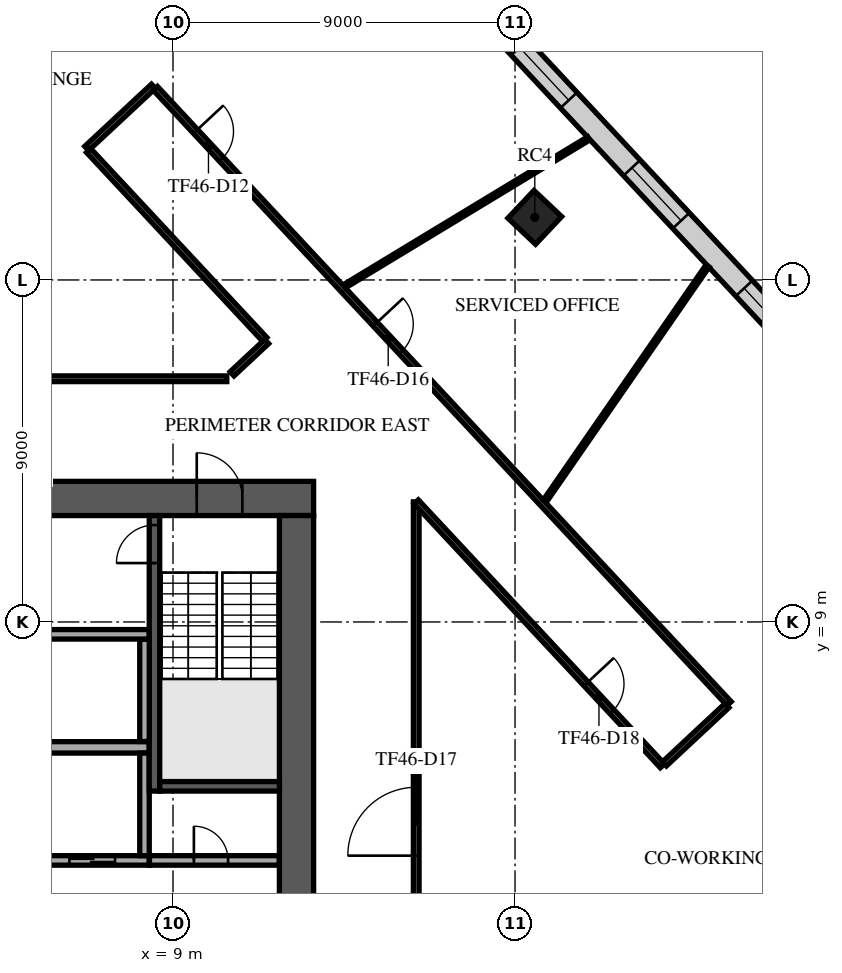
"""IFC4 building model, lengths in metres.
Left out: names, types, materials, properties, quantities, classifications, styles, units other than length and angle.
Written with IfcOpenShell. Run it as: python <this file> out.ifc"""

import sys

from ifc_helpers import new_model, si_unit, direction, frame, frame_2d, origin, origin_2d, place, context, subcontext, project, spatial, rectangle, extrude, element, fill, save


model = new_model("IFC4")
c1 = context("Model", 3, precision=1e-05, world=origin(), true_north=direction((0.0, 1.0)))
c2 = subcontext(c1, "Body", "Model", "MODEL_VIEW")
j1 = project(units=[si_unit("LENGTHUNIT", "METRE"), si_unit("PLANEANGLEUNIT", "RADIAN")], contexts=[c1])
p1 = place(None, origin())
s1 = spatial("IfcSite", under=j1, at=p1, CompositionType="ELEMENT")
p2 = place(p1, origin())
s2 = spatial("IfcBuilding", under=s1, at=p2, CompositionType="ELEMENT")
p3 = place(p2, frame((0.0, 0.0, 197.3)))
s3 = spatial("IfcBuildingStorey", under=s2, at=p3, CompositionType="ELEMENT", Elevation=197.3)
p4 = place(p3, frame((18.52, 19.647, 0.0), z_axis=(0.0, 0.0, 1.0), x_axis=(0.685916152371, 0.727680583715, 0.0)))
e1 = element("IfcColumn", 1, at=p4, inside=s3, PredefinedType="COLUMN", context=c2, shape_type="SweptSolid", body=[
    extrude(rectangle(XDim=1.0, YDim=1.0, at=origin_2d()), origin(), (0.0, 0.0, 1.0), 4.0),
])
p5 = place(p3, frame((-12.7, 12.25, 0.0), z_axis=(0.0, 0.0, 1.0), x_axis=(1.0, 0.0, 0.0)))
e2 = element("IfcWall", 2, at=p5, inside=s3, PredefinedType="SHEAR", context=c2, shape_type="SweptSolid", body=[
    extrude(rectangle(XDim=25.4, YDim=0.9, at=frame_2d((12.7, 0.0))), origin(), (0.0, 0.0, 1.0), 3.62),
])
p6 = place(p5, frame((11.5, 0.0, 0.0)))
e3 = element("IfcOpeningElement", 3, at=p6, cuts=e2, PredefinedType="OPENING", context=c2, shape_type="SweptSolid", body=[
    extrude(rectangle(XDim=2.4, YDim=2.4, at=frame_2d((1.2, 1.2))), frame((0.0, 0.46, 0.0), z_axis=(0.0, -1.0, 0.0), x_axis=(1.0, 0.0, 0.0)), (0.0, 0.0, 1.0), 0.92),
])
p7 = place(p5, frame((22.325, 0.0, 0.0)))
e4 = element("IfcOpeningElement", 4, at=p7, cuts=e2, PredefinedType="OPENING", context=c2, shape_type="SweptSolid", body=[
    extrude(rectangle(XDim=1.2, YDim=2.1, at=frame_2d((0.6, 1.05))), frame((0.0, 0.46, 0.0), z_axis=(0.0, -1.0, 0.0), x_axis=(1.0, 0.0, 0.0)), (0.0, 0.0, 1.0), 0.92),
])
p8 = place(p5, frame((1.3, 0.0, 0.0)))
e5 = element("IfcOpeningElement", 5, at=p8, cuts=e2, PredefinedType="OPENING", context=c2, shape_type="SweptSolid", body=[
    extrude(rectangle(XDim=1.0, YDim=2.1, at=frame_2d((0.5, 1.05))), frame((0.0, 0.46, 0.0), z_axis=(0.0, -1.0, 0.0), x_axis=(1.0, 0.0, 0.0)), (0.0, 0.0, 1.0), 0.92),
])
p9 = place(p3, frame((12.25, -11.8, 0.0), z_axis=(0.0, 0.0, 1.0), x_axis=(0.0, 1.0, 0.0)))
e6 = element("IfcWall", 6, at=p9, inside=s3, PredefinedType="SHEAR", context=c2, shape_type="SweptSolid", body=[
    extrude(rectangle(XDim=23.6, YDim=0.9, at=frame_2d((11.8, 0.0))), origin(), (0.0, 0.0, 1.0), 3.62),
])
p10 = place(p9, frame((10.6, 0.0, 0.0)))
e7 = element("IfcOpeningElement", 7, at=p10, cuts=e6, PredefinedType="OPENING", context=c2, shape_type="SweptSolid", body=[
    extrude(rectangle(XDim=2.4, YDim=2.4, at=frame_2d((1.2, 1.2))), frame((0.0, 0.46, 0.0), z_axis=(0.0, -1.0, 0.0), x_axis=(1.0, 0.0, 0.0)), (0.0, 0.0, 1.0), 0.92),
])
p11 = place(p3, frame((-8.375, 5.7, 0.0), z_axis=(0.0, 0.0, 1.0), x_axis=(1.0, 0.0, 0.0)))
e8 = element("IfcWall", 8, at=p11, inside=s3, PredefinedType="SOLIDWALL", context=c2, shape_type="SweptSolid", body=[
    extrude(rectangle(XDim=16.75, YDim=0.3, at=frame_2d((8.375, 0.0))), origin(), (0.0, 0.0, 1.0), 3.62),
])
p12 = place(p3, frame((-8.375, 2.725, 0.0), z_axis=(0.0, 0.0, 1.0), x_axis=(1.0, 0.0, 0.0)))
e9 = element("IfcWall", 9, at=p12, inside=s3, PredefinedType="SOLIDWALL", context=c2, shape_type="SweptSolid", body=[
    extrude(rectangle(XDim=16.75, YDim=0.25, at=frame_2d((8.375, 0.0))), origin(), (0.0, 0.0, 1.0), 3.62),
])
p13 = place(p12, frame((0.9, 0.0, 0.0)))
e10 = element("IfcOpeningElement", 10, at=p13, cuts=e9, PredefinedType="OPENING", context=c2, shape_type="SweptSolid", body=[
    extrude(rectangle(XDim=1.2, YDim=2.1, at=frame_2d((0.6, 1.05))), frame((0.0, 0.135, 0.0), z_axis=(0.0, -1.0, 0.0), x_axis=(1.0, 0.0, 0.0)), (0.0, 0.0, 1.0), 0.27),
])
p14 = place(p12, frame((3.65, 0.0, 0.0)))
e11 = element("IfcOpeningElement", 11, at=p14, cuts=e9, PredefinedType="OPENING", context=c2, shape_type="SweptSolid", body=[
    extrude(rectangle(XDim=1.2, YDim=2.1, at=frame_2d((0.6, 1.05))), frame((0.0, 0.135, 0.0), z_axis=(0.0, -1.0, 0.0), x_axis=(1.0, 0.0, 0.0)), (0.0, 0.0, 1.0), 0.27),
])
p15 = place(p12, frame((6.4, 0.0, 0.0)))
e12 = element("IfcOpeningElement", 12, at=p15, cuts=e9, PredefinedType="OPENING", context=c2, shape_type="SweptSolid", body=[
    extrude(rectangle(XDim=1.2, YDim=2.1, at=frame_2d((0.6, 1.05))), frame((0.0, 0.135, 0.0), z_axis=(0.0, -1.0, 0.0), x_axis=(1.0, 0.0, 0.0)), (0.0, 0.0, 1.0), 0.27),
])
p16 = place(p12, frame((9.15, 0.0, 0.0)))
e13 = element("IfcOpeningElement", 13, at=p16, cuts=e9, PredefinedType="OPENING", context=c2, shape_type="SweptSolid", body=[
    extrude(rectangle(XDim=1.2, YDim=2.1, at=frame_2d((0.6, 1.05))), frame((0.0, 0.135, 0.0), z_axis=(0.0, -1.0, 0.0), x_axis=(1.0, 0.0, 0.0)), (0.0, 0.0, 1.0), 0.27),
])
p17 = place(p12, frame((11.9, 0.0, 0.0)))
e14 = element("IfcOpeningElement", 14, at=p17, cuts=e9, PredefinedType="OPENING", context=c2, shape_type="SweptSolid", body=[
    extrude(rectangle(XDim=1.2, YDim=2.1, at=frame_2d((0.6, 1.05))), frame((0.0, 0.135, 0.0), z_axis=(0.0, -1.0, 0.0), x_axis=(1.0, 0.0, 0.0)), (0.0, 0.0, 1.0), 0.27),
])
p18 = place(p12, frame((14.65, 0.0, 0.0)))
e15 = element("IfcOpeningElement", 15, at=p18, cuts=e9, PredefinedType="OPENING", context=c2, shape_type="SweptSolid", body=[
    extrude(rectangle(XDim=1.2, YDim=2.1, at=frame_2d((0.6, 1.05))), frame((0.0, 0.135, 0.0), z_axis=(0.0, -1.0, 0.0), x_axis=(1.0, 0.0, 0.0)), (0.0, 0.0, 1.0), 0.27),
])
p19 = place(p3, frame((8.25, 2.85, 0.0), z_axis=(0.0, 0.0, 1.0), x_axis=(0.0, 1.0, 0.0)))
e16 = element("IfcWall", 16, at=p19, inside=s3, PredefinedType="SOLIDWALL", context=c2, shape_type="SweptSolid", body=[
    extrude(rectangle(XDim=2.7, YDim=0.25, at=frame_2d((1.35, 0.0))), origin(), (0.0, 0.0, 1.0), 3.62),
])
p20 = place(p3, frame((8.512, 4.55, 0.0), z_axis=(0.0, 0.0, 1.0), x_axis=(0.0, 1.0, 0.0)))
e17 = element("IfcWall", 17, at=p20, inside=s3, PredefinedType="SOLIDWALL", context=c2, shape_type="SweptSolid", body=[
    extrude(rectangle(XDim=7.25, YDim=0.275, at=frame_2d((3.625, 0.0))), origin(), (0.0, 0.0, 1.0), 3.62),
])
p21 = place(p20, frame((6.0, 0.0, 0.0)))
e18 = element("IfcOpeningElement", 18, at=p21, cuts=e17, PredefinedType="OPENING", context=c2, shape_type="SweptSolid", body=[
    extrude(rectangle(XDim=1.0, YDim=2.1, at=frame_2d((0.5, 1.05))), frame((0.0, 0.147, 0.0), z_axis=(0.0, -1.0, 0.0), x_axis=(1.0, 0.0, 0.0)), (0.0, 0.0, 1.0), 0.295),
])
p22 = place(p3, frame((8.65, 4.675, 0.0), z_axis=(0.0, 0.0, 1.0), x_axis=(1.0, 0.0, 0.0)))
e19 = element("IfcWall", 19, at=p22, inside=s3, PredefinedType="SOLIDWALL", context=c2, shape_type="SweptSolid", body=[
    extrude(rectangle(XDim=3.15, YDim=0.25, at=frame_2d((1.575, 0.0))), origin(), (0.0, 0.0, 1.0), 3.62),
])
p23 = place(p3, frame((8.38, 2.725, 0.0), z_axis=(0.0, 0.0, 1.0), x_axis=(1.0, 0.0, 0.0)))
e20 = element("IfcWall", 20, at=p23, inside=s3, PredefinedType="PARTITIONING", context=c2, shape_type="SweptSolid", body=[
    extrude(rectangle(XDim=3.415, YDim=0.25, at=frame_2d((1.708, 0.0))), origin(), (0.0, 0.0, 1.0), 3.62),
])
p24 = place(p23, frame((1.17, 0.0, 0.0)))
e21 = element("IfcOpeningElement", 21, at=p24, cuts=e20, PredefinedType="OPENING", context=c2, shape_type="SweptSolid", body=[
    extrude(rectangle(XDim=0.9, YDim=2.1, at=frame_2d((0.45, 1.05))), frame((0.0, 0.135, 0.0), z_axis=(0.0, -1.0, 0.0), x_axis=(1.0, 0.0, 0.0)), (0.0, 0.0, 1.0), 0.27),
])
p25 = place(p3, frame((8.25, 5.855, 0.0), z_axis=(0.0, 0.0, 1.0), x_axis=(0.0, 1.0, 0.0)))
e22 = element("IfcWall", 22, at=p25, inside=s3, PredefinedType="PARTITIONING", context=c2, shape_type="SweptSolid", body=[
    extrude(rectangle(XDim=2.69, YDim=0.25, at=frame_2d((1.345, 0.0))), origin(), (0.0, 0.0, 1.0), 3.62),
])
p26 = place(p3, frame((-8.35, 8.675, 0.0), z_axis=(0.0, 0.0, 1.0), x_axis=(1.0, 0.0, 0.0)))
e23 = element("IfcWall", 23, at=p26, inside=s3, PredefinedType="PARTITIONING", context=c2, shape_type="SweptSolid", body=[
    extrude(rectangle(XDim=16.72, YDim=0.25, at=frame_2d((8.36, 0.0))), origin(), (0.0, 0.0, 1.0), 3.62),
])
p27 = place(p26, frame((0.875, 0.0, 0.0)))
e24 = element("IfcOpeningElement", 24, at=p27, cuts=e23, PredefinedType="OPENING", context=c2, shape_type="SweptSolid", body=[
    extrude(rectangle(XDim=1.2, YDim=2.1, at=frame_2d((0.6, 1.05))), frame((0.0, 0.135, 0.0), z_axis=(0.0, -1.0, 0.0), x_axis=(1.0, 0.0, 0.0)), (0.0, 0.0, 1.0), 0.27),
])
p28 = place(p26, frame((11.975, 0.0, 0.0)))
e25 = element("IfcOpeningElement", 25, at=p28, cuts=e23, PredefinedType="OPENING", context=c2, shape_type="SweptSolid", body=[
    extrude(rectangle(XDim=1.0, YDim=2.1, at=frame_2d((0.5, 1.05))), frame((0.0, 0.135, 0.0), z_axis=(0.0, -1.0, 0.0), x_axis=(1.0, 0.0, 0.0)), (0.0, 0.0, 1.0), 0.27),
])
p29 = place(p3, frame((35.02, 5.994, 0.0), z_axis=(0.0, 0.0, 1.0), x_axis=(-0.682002361324, 0.731349970362, 0.0)))
e26 = element("IfcWall", 26, at=p29, inside=s3, PredefinedType="STANDARD", context=c2, shape_type="SweptSolid", body=[
    extrude(rectangle(XDim=39.0, YDim=0.6, at=frame_2d((19.5, 0.0))), origin(), (0.0, 0.0, 1.0), 3.62),
])
p30 = place(p29, frame((1.217, 0.0, 0.9)))
e27 = element("IfcOpeningElement", 27, at=p30, cuts=e26, PredefinedType="OPENING", context=c2, shape_type="SweptSolid", body=[
    extrude(rectangle(XDim=1.9, YDim=2.1, at=frame_2d((0.95, 1.05))), frame((0.0, 0.31, 0.0), z_axis=(0.0, -1.0, 0.0), x_axis=(1.0, 0.0, 0.0)), (0.0, 0.0, 1.0), 0.62),
])
p31 = place(p29, frame((5.55, 0.0, 0.9)))
e28 = element("IfcOpeningElement", 28, at=p31, cuts=e26, PredefinedType="OPENING", context=c2, shape_type="SweptSolid", body=[
    extrude(rectangle(XDim=1.9, YDim=2.1, at=frame_2d((0.95, 1.05))), frame((0.0, 0.31, 0.0), z_axis=(0.0, -1.0, 0.0), x_axis=(1.0, 0.0, 0.0)), (0.0, 0.0, 1.0), 0.62),
])
p32 = place(p29, frame((9.883, 0.0, 0.9)))
e29 = element("IfcOpeningElement", 29, at=p32, cuts=e26, PredefinedType="OPENING", context=c2, shape_type="SweptSolid", body=[
    extrude(rectangle(XDim=1.9, YDim=2.1, at=frame_2d((0.95, 1.05))), frame((0.0, 0.31, 0.0), z_axis=(0.0, -1.0, 0.0), x_axis=(1.0, 0.0, 0.0)), (0.0, 0.0, 1.0), 0.62),
])
p33 = place(p29, frame((14.217, 0.0, 0.9)))
e30 = element("IfcOpeningElement", 30, at=p33, cuts=e26, PredefinedType="OPENING", context=c2, shape_type="SweptSolid", body=[
    extrude(rectangle(XDim=1.9, YDim=2.1, at=frame_2d((0.95, 1.05))), frame((0.0, 0.31, 0.0), z_axis=(0.0, -1.0, 0.0), x_axis=(1.0, 0.0, 0.0)), (0.0, 0.0, 1.0), 0.62),
])
p34 = place(p29, frame((18.55, 0.0, 0.9)))
e31 = element("IfcOpeningElement", 31, at=p34, cuts=e26, PredefinedType="OPENING", context=c2, shape_type="SweptSolid", body=[
    extrude(rectangle(XDim=1.9, YDim=2.1, at=frame_2d((0.95, 1.05))), frame((0.0, 0.31, 0.0), z_axis=(0.0, -1.0, 0.0), x_axis=(1.0, 0.0, 0.0)), (0.0, 0.0, 1.0), 0.62),
])
p35 = place(p29, frame((22.883, 0.0, 0.9)))
e32 = element("IfcOpeningElement", 32, at=p35, cuts=e26, PredefinedType="OPENING", context=c2, shape_type="SweptSolid", body=[
    extrude(rectangle(XDim=1.9, YDim=2.1, at=frame_2d((0.95, 1.05))), frame((0.0, 0.31, 0.0), z_axis=(0.0, -1.0, 0.0), x_axis=(1.0, 0.0, 0.0)), (0.0, 0.0, 1.0), 0.62),
])
p36 = place(p29, frame((27.217, 0.0, 0.9)))
e33 = element("IfcOpeningElement", 33, at=p36, cuts=e26, PredefinedType="OPENING", context=c2, shape_type="SweptSolid", body=[
    extrude(rectangle(XDim=1.9, YDim=2.1, at=frame_2d((0.95, 1.05))), frame((0.0, 0.31, 0.0), z_axis=(0.0, -1.0, 0.0), x_axis=(1.0, 0.0, 0.0)), (0.0, 0.0, 1.0), 0.62),
])
p37 = place(p29, frame((31.55, 0.0, 0.9)))
e34 = element("IfcOpeningElement", 34, at=p37, cuts=e26, PredefinedType="OPENING", context=c2, shape_type="SweptSolid", body=[
    extrude(rectangle(XDim=1.9, YDim=2.1, at=frame_2d((0.95, 1.05))), frame((0.0, 0.31, 0.0), z_axis=(0.0, -1.0, 0.0), x_axis=(1.0, 0.0, 0.0)), (0.0, 0.0, 1.0), 0.62),
])
p38 = place(p29, frame((35.883, 0.0, 0.9)))
e35 = element("IfcOpeningElement", 35, at=p38, cuts=e26, PredefinedType="OPENING", context=c2, shape_type="SweptSolid", body=[
    extrude(rectangle(XDim=1.9, YDim=2.1, at=frame_2d((0.95, 1.05))), frame((0.0, 0.31, 0.0), z_axis=(0.0, -1.0, 0.0), x_axis=(1.0, 0.0, 0.0)), (0.0, 0.0, 1.0), 0.62),
])
p39 = place(p3, frame((-8.129, 15.4, 0.0), z_axis=(0.0, 0.0, 1.0), x_axis=(1.0, 0.0, 0.0)))
e36 = element("IfcWall", 36, at=p39, inside=s3, PredefinedType="PARTITIONING", context=c2, shape_type="SweptSolid", body=[
    extrude(rectangle(XDim=18.544, YDim=0.15, at=frame_2d((9.272, 0.0))), origin(), (0.0, 0.0, 1.0), 3.17),
])
p40 = place(p39, frame((6.05, 0.0, 0.0)))
e37 = element("IfcOpeningElement", 37, at=p40, cuts=e36, PredefinedType="OPENING", context=c2, shape_type="SweptSolid", body=[
    extrude(rectangle(XDim=1.8, YDim=2.1, at=frame_2d((0.9, 1.05))), frame((0.0, 0.085, 0.0), z_axis=(0.0, -1.0, 0.0), x_axis=(1.0, 0.0, 0.0)), (0.0, 0.0, 1.0), 0.17),
])
p41 = place(p3, frame((6.729, 21.461, 0.0), z_axis=(0.0, 0.0, 1.0), x_axis=(0.731451066601, 0.681893933958, 0.0)))
e38 = element("IfcWall", 38, at=p41, inside=s3, PredefinedType="PARTITIONING", context=c2, shape_type="SweptSolid", body=[
    extrude(rectangle(XDim=2.399, YDim=0.15, at=frame_2d((1.2, 0.0))), origin(), (0.0, 0.0, 1.0), 3.62),
])
p42 = place(p3, frame((6.78, 21.406, 0.0), z_axis=(0.0, 0.0, 1.0), x_axis=(0.681923958899, -0.731423074752, 0.0)))
e39 = element("IfcWall", 39, at=p42, inside=s3, PredefinedType="PARTITIONING", context=c2, shape_type="SweptSolid", body=[
    extrude(rectangle(XDim=6.797, YDim=0.15, at=frame_2d((3.398, 0.0))), origin(), (0.0, 0.0, 1.0), 3.17),
])
p43 = place(p3, frame((8.535, 23.042, 0.0), z_axis=(0.0, 0.0, 1.0), x_axis=(0.68201130552, -0.73134162957, 0.0)))
e40 = element("IfcWall", 40, at=p43, inside=s3, PredefinedType="PARTITIONING", context=c2, shape_type="SweptSolid", body=[
    extrude(rectangle(XDim=22.137, YDim=0.15, at=frame_2d((11.069, 0.0))), origin(), (0.0, 0.0, 1.0), 3.17),
])
p44 = place(p43, frame((1.55, 0.0, 0.0)))
e41 = element("IfcOpeningElement", 41, at=p44, cuts=e40, PredefinedType="OPENING", context=c2, shape_type="SweptSolid", body=[
    extrude(rectangle(XDim=1.0, YDim=2.1, at=frame_2d((0.5, 1.05))), frame((0.0, 0.085, 0.0), z_axis=(0.0, -1.0, 0.0), x_axis=(1.0, 0.0, 0.0)), (0.0, 0.0, 1.0), 0.17),
])
p45 = place(p43, frame((8.485, 0.0, 0.0)))
e42 = element("IfcOpeningElement", 42, at=p45, cuts=e40, PredefinedType="OPENING", context=c2, shape_type="SweptSolid", body=[
    extrude(rectangle(XDim=1.0, YDim=2.1, at=frame_2d((0.5, 1.05))), frame((0.0, 0.085, 0.0), z_axis=(0.0, -1.0, 0.0), x_axis=(1.0, 0.0, 0.0)), (0.0, 0.0, 1.0), 0.17),
])
p46 = place(p3, frame((10.554, 15.53, 0.0), z_axis=(0.0, 0.0, 1.0), x_axis=(0.731445889193, 0.681899487596, 0.0)))
e43 = element("IfcWall", 43, at=p46, inside=s3, PredefinedType="PARTITIONING", context=c2, shape_type="SweptSolid", body=[
    extrude(rectangle(XDim=1.247, YDim=0.15, at=frame_2d((0.623, 0.0))), origin(), (0.0, 0.0, 1.0), 3.17),
])
p47 = place(p3, frame((15.4, -8.448, 0.0), z_axis=(0.0, 0.0, 1.0), x_axis=(0.0, 1.0, 0.0)))
e44 = element("IfcWall", 44, at=p47, inside=s3, PredefinedType="PARTITIONING", context=c2, shape_type="SweptSolid", body=[
    extrude(rectangle(XDim=20.608, YDim=0.15, at=frame_2d((10.304, 0.0))), origin(), (0.0, 0.0, 1.0), 3.17),
])
p48 = place(p47, frame((3.3, 0.0, 0.0)))
e45 = element("IfcOpeningElement", 45, at=p48, cuts=e44, PredefinedType="OPENING", context=c2, shape_type="SweptSolid", body=[
    extrude(rectangle(XDim=1.0, YDim=2.1, at=frame_2d((0.5, 1.05))), frame((0.0, 0.085, 0.0), z_axis=(0.0, -1.0, 0.0), x_axis=(1.0, 0.0, 0.0)), (0.0, 0.0, 1.0), 0.17),
])
p49 = place(p47, frame((11.298, 0.0, 0.0)))
e46 = element("IfcOpeningElement", 46, at=p49, cuts=e44, PredefinedType="OPENING", context=c2, shape_type="SweptSolid", body=[
    extrude(rectangle(XDim=1.8, YDim=2.1, at=frame_2d((0.9, 1.05))), frame((0.0, 0.085, 0.0), z_axis=(0.0, -1.0, 0.0), x_axis=(1.0, 0.0, 0.0)), (0.0, 0.0, 1.0), 0.17),
])
p50 = place(p3, frame((15.4, 12.162, 0.0), z_axis=(0.0, 0.0, 1.0), x_axis=(0.681988505996, -0.73136289056, 0.0)))
e47 = element("IfcWall", 47, at=p50, inside=s3, PredefinedType="PARTITIONING", context=c2, shape_type="SweptSolid", body=[
    extrude(rectangle(XDim=9.499, YDim=0.15, at=frame_2d((4.75, 0.0))), origin(), (0.0, 0.0, 1.0), 3.17),
])
p51 = place(p50, frame((6.551, 0.0, 0.0)))
e48 = element("IfcOpeningElement", 48, at=p51, cuts=e47, PredefinedType="OPENING", context=c2, shape_type="SweptSolid", body=[
    extrude(rectangle(XDim=1.0, YDim=2.1, at=frame_2d((0.5, 1.05))), frame((0.0, 0.085, 0.0), z_axis=(0.0, -1.0, 0.0), x_axis=(1.0, 0.0, 0.0)), (0.0, 0.0, 1.0), 0.17),
])
p52 = place(p3, frame((21.933, 5.266, 0.0), z_axis=(0.0, 0.0, 1.0), x_axis=(0.731257309388, 0.682101713431, 0.0)))
e49 = element("IfcWall", 49, at=p52, inside=s3, PredefinedType="PARTITIONING", context=c2, shape_type="SweptSolid", body=[
    extrude(rectangle(XDim=2.25, YDim=0.15, at=frame_2d((1.125, 0.0))), origin(), (0.0, 0.0, 1.0), 3.62),
])
p53 = place(p3, frame((13.51, 17.833, 0.0), z_axis=(0.0, 0.0, 1.0), x_axis=(0.855459551992, 0.517869631186, 0.0)))
e50 = element("IfcWall", 50, at=p53, inside=s3, PredefinedType="PARTITIONING", context=c2, shape_type="SweptSolid", body=[
    extrude(rectangle(XDim=7.515, YDim=0.1, at=frame_2d((3.757, 0.0))), origin(), (0.0, 0.0, 1.0), 2.97),
])
p54 = place(p3, frame((18.783, 12.179, 0.0), z_axis=(0.0, 0.0, 1.0), x_axis=(0.568978927241, 0.822352102421, 0.0)))
e51 = element("IfcWall", 51, at=p54, inside=s3, PredefinedType="PARTITIONING", context=c2, shape_type="SweptSolid", body=[
    extrude(rectangle(XDim=7.528, YDim=0.1, at=frame_2d((3.764, 0.0))), origin(), (0.0, 0.0, 1.0), 2.97),
])
p55 = place(p7, origin())
e52 = element("IfcDoor", 52, at=p55, inside=s3, OperationType="SINGLE_SWING_LEFT", PredefinedType="DOOR", context=c2, shape_type="SweptSolid", body=[
    extrude(rectangle(XDim=1.2, YDim=2.1, at=frame_2d((0.6, 1.05))), frame((0.0, 0.025, 0.0), z_axis=(0.0, -1.0, 0.0), x_axis=(1.0, 0.0, 0.0)), (0.0, 0.0, 1.0), 0.05),
])
fill(e4, e52)
p56 = place(p18, origin())
e53 = element("IfcDoor", 53, at=p56, inside=s3, OperationType="DOUBLE_DOOR_SLIDING", PredefinedType="DOOR", context=c2, shape_type="SweptSolid", body=[
    extrude(rectangle(XDim=1.2, YDim=2.1, at=frame_2d((0.6, 1.05))), frame((0.0, 0.025, 0.0), z_axis=(0.0, -1.0, 0.0), x_axis=(1.0, 0.0, 0.0)), (0.0, 0.0, 1.0), 0.05),
])
fill(e15, e53)
p57 = place(p21, origin())
e54 = element("IfcDoor", 54, at=p57, inside=s3, OperationType="SINGLE_SWING_LEFT", PredefinedType="DOOR", context=c2, shape_type="SweptSolid", body=[
    extrude(rectangle(XDim=1.0, YDim=2.1, at=frame_2d((0.5, 1.05))), frame((0.0, 0.025, 0.0), z_axis=(0.0, -1.0, 0.0), x_axis=(1.0, 0.0, 0.0)), (0.0, 0.0, 1.0), 0.05),
])
fill(e18, e54)
p58 = place(p24, origin())
e55 = element("IfcDoor", 55, at=p58, inside=s3, OperationType="SINGLE_SWING_LEFT", PredefinedType="DOOR", context=c2, shape_type="SweptSolid", body=[
    extrude(rectangle(XDim=0.9, YDim=2.1, at=frame_2d((0.45, 1.05))), frame((0.0, 0.025, 0.0), z_axis=(0.0, -1.0, 0.0), x_axis=(1.0, 0.0, 0.0)), (0.0, 0.0, 1.0), 0.05),
])
fill(e21, e55)
p59 = place(p33, origin())
e56 = element("IfcWindow", 56, at=p59, inside=s3, PartitioningType="SINGLE_PANEL", PredefinedType="WINDOW", context=c2, shape_type="SweptSolid", body=[
    extrude(rectangle(XDim=1.9, YDim=2.1, at=frame_2d((0.95, 1.05))), frame((0.0, 0.03, 0.0), z_axis=(0.0, -1.0, 0.0), x_axis=(1.0, 0.0, 0.0)), (0.0, 0.0, 1.0), 0.06),
])
fill(e30, e56)
p60 = place(p34, origin())
e57 = element("IfcWindow", 57, at=p60, inside=s3, PartitioningType="SINGLE_PANEL", PredefinedType="WINDOW", context=c2, shape_type="SweptSolid", body=[
    extrude(rectangle(XDim=1.9, YDim=2.1, at=frame_2d((0.95, 1.05))), frame((0.0, 0.03, 0.0), z_axis=(0.0, -1.0, 0.0), x_axis=(1.0, 0.0, 0.0)), (0.0, 0.0, 1.0), 0.06),
])
fill(e31, e57)
p61 = place(p35, origin())
e58 = element("IfcWindow", 58, at=p61, inside=s3, PartitioningType="SINGLE_PANEL", PredefinedType="WINDOW", context=c2, shape_type="SweptSolid", body=[
    extrude(rectangle(XDim=1.9, YDim=2.1, at=frame_2d((0.95, 1.05))), frame((0.0, 0.03, 0.0), z_axis=(0.0, -1.0, 0.0), x_axis=(1.0, 0.0, 0.0)), (0.0, 0.0, 1.0), 0.06),
])
fill(e32, e58)
p62 = place(p44, origin())
e59 = element("IfcDoor", 59, at=p62, inside=s3, OperationType="SINGLE_SWING_RIGHT", PredefinedType="DOOR", context=c2, shape_type="SweptSolid", body=[
    extrude(rectangle(XDim=1.0, YDim=2.1, at=frame_2d((0.5, 1.05))), frame((0.0, 0.025, 0.0), z_axis=(0.0, -1.0, 0.0), x_axis=(1.0, 0.0, 0.0)), (0.0, 0.0, 1.0), 0.05),
])
fill(e41, e59)
p63 = place(p45, origin())
e60 = element("IfcDoor", 60, at=p63, inside=s3, OperationType="SINGLE_SWING_RIGHT", PredefinedType="DOOR", context=c2, shape_type="SweptSolid", body=[
    extrude(rectangle(XDim=1.0, YDim=2.1, at=frame_2d((0.5, 1.05))), frame((0.0, 0.025, 0.0), z_axis=(0.0, -1.0, 0.0), x_axis=(1.0, 0.0, 0.0)), (0.0, 0.0, 1.0), 0.05),
])
fill(e42, e60)
p64 = place(p49, frame((1.8, 0.0, 0.0), z_axis=(0.0, 0.0, 1.0), x_axis=(-1.0, 0.0, 0.0)))
e61 = element("IfcDoor", 61, at=p64, inside=s3, OperationType="DOUBLE_DOOR_SINGLE_SWING", PredefinedType="DOOR", context=c2, shape_type="SweptSolid", body=[
    extrude(rectangle(XDim=1.8, YDim=2.1, at=frame_2d((0.9, 1.05))), frame((0.0, 0.025, 0.0), z_axis=(0.0, -1.0, 0.0), x_axis=(1.0, 0.0, 0.0)), (0.0, 0.0, 1.0), 0.05),
])
fill(e46, e61)
p65 = place(p51, frame((1.0, 0.0, 0.0), z_axis=(0.0, 0.0, 1.0), x_axis=(-1.0, 0.0, 0.0)))
e62 = element("IfcDoor", 62, at=p65, inside=s3, OperationType="SINGLE_SWING_RIGHT", PredefinedType="DOOR", context=c2, shape_type="SweptSolid", body=[
    extrude(rectangle(XDim=1.0, YDim=2.1, at=frame_2d((0.5, 1.05))), frame((0.0, 0.025, 0.0), z_axis=(0.0, -1.0, 0.0), x_axis=(1.0, 0.0, 0.0)), (0.0, 0.0, 1.0), 0.05),
])
fill(e48, e62)
save(model, sys.argv[1])
